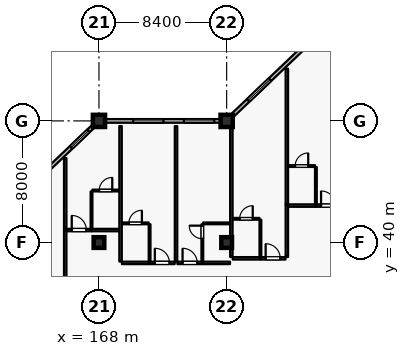
"""IFC4 building model, lengths in metres.
Left out: names, types, materials, properties, quantities, classifications, styles, units other than length and angle.
Written with IfcOpenShell. Run it as: python <this file> out.ifc"""

import sys

from ifc_helpers import new_model, si_unit, direction, frame, frame_2d, origin, origin_2d, place, context, subcontext, project, spatial, rectangle, extrude, element, fill, save


model = new_model("IFC4")
c1 = context("Model", 3, precision=1e-05, world=origin(), true_north=direction((0.0, 1.0)))
c2 = subcontext(c1, "Body", "Model", "MODEL_VIEW")
j1 = project(units=[si_unit("LENGTHUNIT", "METRE"), si_unit("PLANEANGLEUNIT", "RADIAN")], contexts=[c1])
p1 = place(None, origin())
s1 = spatial("IfcSite", under=j1, at=p1, CompositionType="ELEMENT")
p2 = place(p1, origin())
s2 = spatial("IfcBuilding", under=s1, at=p2, CompositionType="ELEMENT")
p3 = place(p2, frame((0.0, 0.0, 11.4)))
s3 = spatial("IfcBuildingStorey", under=s2, at=p3, CompositionType="ELEMENT", Elevation=11.4)
for number, where, z_axis, x_axis in (
    (1, (168.0, 48.0, 0.0), (0.0, 0.0, 1.0), (1.0, 0.0, 0.0)),
    (2, (176.4, 48.0, 0.0), (0.0, 0.0, 1.0), (1.0, 0.0, 0.0)),
):
    element("IfcColumn", number, at=place(p3, frame(where, z_axis=z_axis, x_axis=x_axis)), inside=s3, PredefinedType="COLUMN", context=c2, shape_type="SweptSolid", body=[
        extrude(rectangle(XDim=0.8, YDim=0.8, at=origin_2d()), origin(), (0.0, 0.0, 1.0), 4.8),
    ])
for number, where, z_axis, x_axis in (
    (3, (168.0, 40.0, 0.0), (0.0, 0.0, 1.0), (1.0, 0.0, 0.0)),
    (4, (176.4, 40.0, 0.0), (0.0, 0.0, 1.0), (1.0, 0.0, 0.0)),
):
    element("IfcColumn", number, at=place(p3, frame(where, z_axis=z_axis, x_axis=x_axis)), inside=s3, PredefinedType="COLUMN", context=c2, shape_type="SweptSolid", body=[
        extrude(rectangle(XDim=0.7, YDim=0.7, at=origin_2d()), origin(), (0.0, 0.0, 1.0), 4.8),
    ])
p4 = place(p3, frame((160.0, 40.381, 0.0), z_axis=(0.0, 0.0, 1.0), x_axis=(0.724156739794, 0.689635422677, 0.0)))
e5 = element("IfcWall", 5, at=p4, inside=s3, PredefinedType="SOLIDWALL", context=c2, shape_type="SweptSolid", body=[
    extrude(rectangle(XDim=10.495, YDim=0.24, at=frame_2d((5.248, 0.0))), origin(), (0.0, 0.0, 1.0), 4.13),
])
p5 = place(p4, frame((0.602, 0.0, 0.8)))
e6 = element("IfcOpeningElement", 6, at=p5, cuts=e5, PredefinedType="OPENING", context=c2, shape_type="SweptSolid", body=[
    extrude(rectangle(XDim=1.6, YDim=1.6, at=frame_2d((0.8, 0.8))), frame((0.0, 0.13, 0.0), z_axis=(0.0, -1.0, 0.0), x_axis=(1.0, 0.0, 0.0)), (0.0, 0.0, 1.0), 0.26),
])
p6 = place(p4, frame((4.662, 0.0, 0.8)))
e7 = element("IfcOpeningElement", 7, at=p6, cuts=e5, PredefinedType="OPENING", context=c2, shape_type="SweptSolid", body=[
    extrude(rectangle(XDim=1.6, YDim=1.6, at=frame_2d((0.8, 0.8))), frame((0.0, 0.13, 0.0), z_axis=(0.0, -1.0, 0.0), x_axis=(1.0, 0.0, 0.0)), (0.0, 0.0, 1.0), 0.26),
])
p7 = place(p4, frame((8.508, 0.0, 0.8)))
e8 = element("IfcOpeningElement", 8, at=p7, cuts=e5, PredefinedType="OPENING", context=c2, shape_type="SweptSolid", body=[
    extrude(rectangle(XDim=1.6, YDim=1.6, at=frame_2d((0.8, 0.8))), frame((0.0, 0.13, 0.0), z_axis=(0.0, -1.0, 0.0), x_axis=(1.0, 0.0, 0.0)), (0.0, 0.0, 1.0), 0.26),
])
p8 = place(p3, frame((168.4, 48.0, 0.0), z_axis=(0.0, 0.0, 1.0), x_axis=(1.0, 0.0, 0.0)))
e9 = element("IfcWall", 9, at=p8, inside=s3, PredefinedType="SOLIDWALL", context=c2, shape_type="SweptSolid", body=[
    extrude(rectangle(XDim=7.6, YDim=0.24, at=frame_2d((3.8, 0.0))), origin(), (0.0, 0.0, 1.0), 4.13),
])
p9 = place(p8, frame((1.845, 0.0, 0.8)))
e10 = element("IfcOpeningElement", 10, at=p9, cuts=e9, PredefinedType="OPENING", context=c2, shape_type="SweptSolid", body=[
    extrude(rectangle(XDim=2.0, YDim=1.75, at=frame_2d((1.0, 0.875))), frame((0.0, 0.13, 0.0), z_axis=(0.0, -1.0, 0.0), x_axis=(1.0, 0.0, 0.0)), (0.0, 0.0, 1.0), 0.26),
])
p10 = place(p8, frame((5.185, 0.0, 0.8)))
e11 = element("IfcOpeningElement", 11, at=p10, cuts=e9, PredefinedType="OPENING", context=c2, shape_type="SweptSolid", body=[
    extrude(rectangle(XDim=2.0, YDim=1.75, at=frame_2d((1.0, 0.875))), frame((0.0, 0.13, 0.0), z_axis=(0.0, -1.0, 0.0), x_axis=(1.0, 0.0, 0.0)), (0.0, 0.0, 1.0), 0.26),
])
p11 = place(p3, frame((176.8, 48.381, 0.0), z_axis=(0.0, 0.0, 1.0), x_axis=(0.724145676014, 0.689647040094, 0.0)))
e12 = element("IfcWall", 12, at=p11, inside=s3, PredefinedType="SOLIDWALL", context=c2, shape_type="SweptSolid", body=[
    extrude(rectangle(XDim=10.495, YDim=0.24, at=frame_2d((5.248, 0.0))), origin(), (0.0, 0.0, 1.0), 4.13),
])
p12 = place(p11, frame((1.396, 0.0, 0.8)))
e13 = element("IfcOpeningElement", 13, at=p12, cuts=e12, PredefinedType="OPENING", context=c2, shape_type="SweptSolid", body=[
    extrude(rectangle(XDim=2.0, YDim=1.75, at=frame_2d((1.0, 0.875))), frame((0.0, 0.13, 0.0), z_axis=(0.0, -1.0, 0.0), x_axis=(1.0, 0.0, 0.0)), (0.0, 0.0, 1.0), 0.26),
])
p13 = place(p11, frame((6.429, 0.0, 0.8)))
e14 = element("IfcOpeningElement", 14, at=p13, cuts=e12, PredefinedType="OPENING", context=c2, shape_type="SweptSolid", body=[
    extrude(rectangle(XDim=2.0, YDim=1.75, at=frame_2d((1.0, 0.875))), frame((0.0, 0.13, 0.0), z_axis=(0.0, -1.0, 0.0), x_axis=(1.0, 0.0, 0.0)), (0.0, 0.0, 1.0), 0.26),
])
p14 = place(p3, frame((165.78, 32.26, 0.0), z_axis=(0.0, 0.0, 1.0), x_axis=(0.0, 1.0, 0.0)))
e15 = element("IfcWall", 15, at=p14, inside=s3, PredefinedType="PARTITIONING", context=c2, shape_type="SweptSolid", body=[
    extrude(rectangle(XDim=8.64, YDim=0.16, at=frame_2d((4.32, 0.0))), origin(), (0.0, 0.0, 1.0), 4.535),
])
p15 = place(p3, frame((165.87, 40.82, 0.0), z_axis=(0.0, 0.0, 1.0), x_axis=(1.0, 0.0, 0.0)))
e16 = element("IfcWall", 16, at=p15, inside=s3, PredefinedType="PARTITIONING", context=c2, shape_type="SweptSolid", body=[
    extrude(rectangle(XDim=1.64, YDim=0.16, at=frame_2d((0.82, 0.0))), origin(), (0.0, 0.0, 1.0), 4.535),
])
p16 = place(p15, frame((0.34, 0.0, 0.0)))
e17 = element("IfcOpeningElement", 17, at=p16, cuts=e16, PredefinedType="OPENING", context=c2, shape_type="SweptSolid", body=[
    extrude(rectangle(XDim=0.96, YDim=2.2, at=frame_2d((0.48, 1.1))), frame((0.0, 0.09, 0.0), z_axis=(0.0, -1.0, 0.0), x_axis=(1.0, 0.0, 0.0)), (0.0, 0.0, 1.0), 0.18),
])
p17 = place(p3, frame((167.52, 40.82, 0.0), z_axis=(0.0, 0.0, 1.0), x_axis=(1.0, 0.0, 0.0)))
e18 = element("IfcWall", 18, at=p17, inside=s3, PredefinedType="PARTITIONING", context=c2, shape_type="SweptSolid", body=[
    extrude(rectangle(XDim=1.81, YDim=0.16, at=frame_2d((0.905, 0.0))), origin(), (0.0, 0.0, 1.0), 4.535),
])
p18 = place(p3, frame((167.51, 40.91, 0.0), z_axis=(0.0, 0.0, 1.0), x_axis=(0.0, 1.0, 0.0)))
e19 = element("IfcWall", 19, at=p18, inside=s3, PredefinedType="PARTITIONING", context=c2, shape_type="SweptSolid", body=[
    extrude(rectangle(XDim=2.45, YDim=0.115, at=frame_2d((1.225, 0.0))), origin(), (0.0, 0.0, 1.0), 4.535),
])
p19 = place(p3, frame((167.57, 43.42, 0.0), z_axis=(0.0, 0.0, 1.0), x_axis=(1.0, 0.0, 0.0)))
e20 = element("IfcWall", 20, at=p19, inside=s3, PredefinedType="PARTITIONING", context=c2, shape_type="SweptSolid", body=[
    extrude(rectangle(XDim=1.75, YDim=0.115, at=frame_2d((0.875, 0.0))), origin(), (0.0, 0.0, 1.0), 4.535),
])
p20 = place(p19, frame((0.445, 0.0, 0.0)))
e21 = element("IfcOpeningElement", 21, at=p20, cuts=e20, PredefinedType="OPENING", context=c2, shape_type="SweptSolid", body=[
    extrude(rectangle(XDim=0.86, YDim=2.12, at=frame_2d((0.43, 1.06))), frame((0.0, 0.067, 0.0), z_axis=(0.0, -1.0, 0.0), x_axis=(1.0, 0.0, 0.0)), (0.0, 0.0, 1.0), 0.135),
])
p21 = place(p3, frame((165.78, 40.91, 0.0), z_axis=(0.0, 0.0, 1.0), x_axis=(0.0, 1.0, 0.0)))
e22 = element("IfcWall", 22, at=p21, inside=s3, PredefinedType="PARTITIONING", context=c2, shape_type="SweptSolid", body=[
    extrude(rectangle(XDim=4.64, YDim=0.16, at=frame_2d((2.32, 0.0))), origin(), (0.0, 0.0, 1.0), 4.535),
])
p22 = place(p3, frame((169.51, 38.66, 0.0), z_axis=(0.0, 0.0, 1.0), x_axis=(1.0, 0.0, 0.0)))
e23 = element("IfcWall", 23, at=p22, inside=s3, PredefinedType="PARTITIONING", context=c2, shape_type="SweptSolid", body=[
    extrude(rectangle(XDim=1.81, YDim=0.16, at=frame_2d((0.905, 0.0))), origin(), (0.0, 0.0, 1.0), 4.535),
])
p23 = place(p3, frame((171.33, 38.66, 0.0), z_axis=(0.0, 0.0, 1.0), x_axis=(1.0, 0.0, 0.0)))
e24 = element("IfcWall", 24, at=p23, inside=s3, PredefinedType="PARTITIONING", context=c2, shape_type="SweptSolid", body=[
    extrude(rectangle(XDim=1.65, YDim=0.16, at=frame_2d((0.825, 0.0))), origin(), (0.0, 0.0, 1.0), 4.535),
])
p24 = place(p23, frame((0.345, 0.0, 0.0)))
e25 = element("IfcOpeningElement", 25, at=p24, cuts=e24, PredefinedType="OPENING", context=c2, shape_type="SweptSolid", body=[
    extrude(rectangle(XDim=0.96, YDim=2.2, at=frame_2d((0.48, 1.1))), frame((0.0, 0.09, 0.0), z_axis=(0.0, -1.0, 0.0), x_axis=(1.0, 0.0, 0.0)), (0.0, 0.0, 1.0), 0.18),
])
p25 = place(p3, frame((171.33, 38.75, 0.0), z_axis=(0.0, 0.0, 1.0), x_axis=(0.0, 1.0, 0.0)))
e26 = element("IfcWall", 26, at=p25, inside=s3, PredefinedType="PARTITIONING", context=c2, shape_type="SweptSolid", body=[
    extrude(rectangle(XDim=2.45, YDim=0.115, at=frame_2d((1.225, 0.0))), origin(), (0.0, 0.0, 1.0), 4.535),
])
p26 = place(p3, frame((169.52, 41.26, 0.0), z_axis=(0.0, 0.0, 1.0), x_axis=(1.0, 0.0, 0.0)))
e27 = element("IfcWall", 27, at=p26, inside=s3, PredefinedType="PARTITIONING", context=c2, shape_type="SweptSolid", body=[
    extrude(rectangle(XDim=1.75, YDim=0.115, at=frame_2d((0.875, 0.0))), origin(), (0.0, 0.0, 1.0), 4.535),
])
p27 = place(p26, frame((0.445, 0.0, 0.0)))
e28 = element("IfcOpeningElement", 28, at=p27, cuts=e27, PredefinedType="OPENING", context=c2, shape_type="SweptSolid", body=[
    extrude(rectangle(XDim=0.86, YDim=2.12, at=frame_2d((0.43, 1.06))), frame((0.0, 0.067, 0.0), z_axis=(0.0, -1.0, 0.0), x_axis=(1.0, 0.0, 0.0)), (0.0, 0.0, 1.0), 0.135),
])
p28 = place(p3, frame((169.42, 38.75, 0.0), z_axis=(0.0, 0.0, 1.0), x_axis=(0.0, 1.0, 0.0)))
e29 = element("IfcWall", 29, at=p28, inside=s3, PredefinedType="PARTITIONING", context=c2, shape_type="SweptSolid", body=[
    extrude(rectangle(XDim=8.91, YDim=0.16, at=frame_2d((4.455, 0.0))), origin(), (0.0, 0.0, 1.0), 4.535),
])
p29 = place(p3, frame((173.16, 38.66, 0.0), z_axis=(0.0, 0.0, 1.0), x_axis=(1.0, 0.0, 0.0)))
e30 = element("IfcWall", 30, at=p29, inside=s3, PredefinedType="PARTITIONING", context=c2, shape_type="SweptSolid", body=[
    extrude(rectangle(XDim=1.64, YDim=0.16, at=frame_2d((0.82, 0.0))), origin(), (0.0, 0.0, 1.0), 4.535),
])
p30 = place(p29, frame((0.34, 0.0, 0.0)))
e31 = element("IfcOpeningElement", 31, at=p30, cuts=e30, PredefinedType="OPENING", context=c2, shape_type="SweptSolid", body=[
    extrude(rectangle(XDim=0.96, YDim=2.2, at=frame_2d((0.48, 1.1))), frame((0.0, 0.09, 0.0), z_axis=(0.0, -1.0, 0.0), x_axis=(1.0, 0.0, 0.0)), (0.0, 0.0, 1.0), 0.18),
])
p31 = place(p3, frame((174.81, 38.66, 0.0), z_axis=(0.0, 0.0, 1.0), x_axis=(1.0, 0.0, 0.0)))
e32 = element("IfcWall", 32, at=p31, inside=s3, PredefinedType="PARTITIONING", context=c2, shape_type="SweptSolid", body=[
    extrude(rectangle(XDim=1.81, YDim=0.16, at=frame_2d((0.905, 0.0))), origin(), (0.0, 0.0, 1.0), 4.535),
])
p32 = place(p3, frame((174.8, 38.75, 0.0), z_axis=(0.0, 0.0, 1.0), x_axis=(0.0, 1.0, 0.0)))
e33 = element("IfcWall", 33, at=p32, inside=s3, PredefinedType="PARTITIONING", context=c2, shape_type="SweptSolid", body=[
    extrude(rectangle(XDim=2.45, YDim=0.115, at=frame_2d((1.225, 0.0))), origin(), (0.0, 0.0, 1.0), 4.535),
])
p33 = place(p32, frame((1.5, 0.0, 0.0)))
e34 = element("IfcOpeningElement", 34, at=p33, cuts=e33, PredefinedType="OPENING", context=c2, shape_type="SweptSolid", body=[
    extrude(rectangle(XDim=0.86, YDim=2.12, at=frame_2d((0.43, 1.06))), frame((0.0, 0.067, 0.0), z_axis=(0.0, -1.0, 0.0), x_axis=(1.0, 0.0, 0.0)), (0.0, 0.0, 1.0), 0.135),
])
p34 = place(p3, frame((174.86, 41.26, 0.0), z_axis=(0.0, 0.0, 1.0), x_axis=(1.0, 0.0, 0.0)))
e35 = element("IfcWall", 35, at=p34, inside=s3, PredefinedType="PARTITIONING", context=c2, shape_type="SweptSolid", body=[
    extrude(rectangle(XDim=1.75, YDim=0.115, at=frame_2d((0.875, 0.0))), origin(), (0.0, 0.0, 1.0), 4.535),
])
p35 = place(p3, frame((173.07, 38.75, 0.0), z_axis=(0.0, 0.0, 1.0), x_axis=(0.0, 1.0, 0.0)))
e36 = element("IfcWall", 36, at=p35, inside=s3, PredefinedType="PARTITIONING", context=c2, shape_type="SweptSolid", body=[
    extrude(rectangle(XDim=8.91, YDim=0.16, at=frame_2d((4.455, 0.0))), origin(), (0.0, 0.0, 1.0), 4.535),
])
p36 = place(p3, frame((176.8, 38.96, 0.0), z_axis=(0.0, 0.0, 1.0), x_axis=(1.0, 0.0, 0.0)))
e37 = element("IfcWall", 37, at=p36, inside=s3, PredefinedType="PARTITIONING", context=c2, shape_type="SweptSolid", body=[
    extrude(rectangle(XDim=1.81, YDim=0.16, at=frame_2d((0.905, 0.0))), origin(), (0.0, 0.0, 1.0), 4.535),
])
p37 = place(p3, frame((178.62, 38.96, 0.0), z_axis=(0.0, 0.0, 1.0), x_axis=(1.0, 0.0, 0.0)))
e38 = element("IfcWall", 38, at=p37, inside=s3, PredefinedType="PARTITIONING", context=c2, shape_type="SweptSolid", body=[
    extrude(rectangle(XDim=1.65, YDim=0.16, at=frame_2d((0.825, 0.0))), origin(), (0.0, 0.0, 1.0), 4.535),
])
p38 = place(p37, frame((0.345, 0.0, 0.0)))
e39 = element("IfcOpeningElement", 39, at=p38, cuts=e38, PredefinedType="OPENING", context=c2, shape_type="SweptSolid", body=[
    extrude(rectangle(XDim=0.96, YDim=2.2, at=frame_2d((0.48, 1.1))), frame((0.0, 0.09, 0.0), z_axis=(0.0, -1.0, 0.0), x_axis=(1.0, 0.0, 0.0)), (0.0, 0.0, 1.0), 0.18),
])
p39 = place(p3, frame((178.62, 39.05, 0.0), z_axis=(0.0, 0.0, 1.0), x_axis=(0.0, 1.0, 0.0)))
e40 = element("IfcWall", 40, at=p39, inside=s3, PredefinedType="PARTITIONING", context=c2, shape_type="SweptSolid", body=[
    extrude(rectangle(XDim=2.45, YDim=0.115, at=frame_2d((1.225, 0.0))), origin(), (0.0, 0.0, 1.0), 4.535),
])
p40 = place(p3, frame((176.81, 41.56, 0.0), z_axis=(0.0, 0.0, 1.0), x_axis=(1.0, 0.0, 0.0)))
e41 = element("IfcWall", 41, at=p40, inside=s3, PredefinedType="PARTITIONING", context=c2, shape_type="SweptSolid", body=[
    extrude(rectangle(XDim=1.75, YDim=0.115, at=frame_2d((0.875, 0.0))), origin(), (0.0, 0.0, 1.0), 4.535),
])
p41 = place(p40, frame((0.445, 0.0, 0.0)))
e42 = element("IfcOpeningElement", 42, at=p41, cuts=e41, PredefinedType="OPENING", context=c2, shape_type="SweptSolid", body=[
    extrude(rectangle(XDim=0.86, YDim=2.12, at=frame_2d((0.43, 1.06))), frame((0.0, 0.067, 0.0), z_axis=(0.0, -1.0, 0.0), x_axis=(1.0, 0.0, 0.0)), (0.0, 0.0, 1.0), 0.135),
])
p42 = place(p3, frame((176.71, 39.05, 0.0), z_axis=(0.0, 0.0, 1.0), x_axis=(0.0, 1.0, 0.0)))
e43 = element("IfcWall", 43, at=p42, inside=s3, PredefinedType="PARTITIONING", context=c2, shape_type="SweptSolid", body=[
    extrude(rectangle(XDim=8.91, YDim=0.16, at=frame_2d((4.455, 0.0))), origin(), (0.0, 0.0, 1.0), 4.535),
])
p43 = place(p3, frame((180.36, 39.05, 0.0), z_axis=(0.0, 0.0, 1.0), x_axis=(0.0, 1.0, 0.0)))
e44 = element("IfcWall", 44, at=p43, inside=s3, PredefinedType="PARTITIONING", context=c2, shape_type="SweptSolid", body=[
    extrude(rectangle(XDim=3.46, YDim=0.16, at=frame_2d((1.73, 0.0))), origin(), (0.0, 0.0, 1.0), 4.535),
])
p44 = place(p3, frame((180.45, 42.43, 0.0), z_axis=(0.0, 0.0, 1.0), x_axis=(1.0, 0.0, 0.0)))
e45 = element("IfcWall", 45, at=p44, inside=s3, PredefinedType="PARTITIONING", context=c2, shape_type="SweptSolid", body=[
    extrude(rectangle(XDim=1.81, YDim=0.16, at=frame_2d((0.905, 0.0))), origin(), (0.0, 0.0, 1.0), 4.535),
])
p45 = place(p3, frame((182.27, 42.43, 0.0), z_axis=(0.0, 0.0, 1.0), x_axis=(1.0, 0.0, 0.0)))
e46 = element("IfcWall", 46, at=p45, inside=s3, PredefinedType="PARTITIONING", context=c2, shape_type="SweptSolid", body=[
    extrude(rectangle(XDim=1.64, YDim=0.16, at=frame_2d((0.82, 0.0))), origin(), (0.0, 0.0, 1.0), 4.535),
])
p46 = place(p45, frame((0.34, 0.0, 0.0)))
e47 = element("IfcOpeningElement", 47, at=p46, cuts=e46, PredefinedType="OPENING", context=c2, shape_type="SweptSolid", body=[
    extrude(rectangle(XDim=0.96, YDim=2.2, at=frame_2d((0.48, 1.1))), frame((0.0, 0.09, 0.0), z_axis=(0.0, -1.0, 0.0), x_axis=(1.0, 0.0, 0.0)), (0.0, 0.0, 1.0), 0.18),
])
p47 = place(p3, frame((182.27, 42.52, 0.0), z_axis=(0.0, 0.0, 1.0), x_axis=(0.0, 1.0, 0.0)))
e48 = element("IfcWall", 48, at=p47, inside=s3, PredefinedType="PARTITIONING", context=c2, shape_type="SweptSolid", body=[
    extrude(rectangle(XDim=2.45, YDim=0.115, at=frame_2d((1.225, 0.0))), origin(), (0.0, 0.0, 1.0), 4.535),
])
p48 = place(p3, frame((180.46, 45.03, 0.0), z_axis=(0.0, 0.0, 1.0), x_axis=(1.0, 0.0, 0.0)))
e49 = element("IfcWall", 49, at=p48, inside=s3, PredefinedType="PARTITIONING", context=c2, shape_type="SweptSolid", body=[
    extrude(rectangle(XDim=1.75, YDim=0.115, at=frame_2d((0.875, 0.0))), origin(), (0.0, 0.0, 1.0), 4.535),
])
p49 = place(p48, frame((0.445, 0.0, 0.0)))
e50 = element("IfcOpeningElement", 50, at=p49, cuts=e49, PredefinedType="OPENING", context=c2, shape_type="SweptSolid", body=[
    extrude(rectangle(XDim=0.86, YDim=2.12, at=frame_2d((0.43, 1.06))), frame((0.0, 0.067, 0.0), z_axis=(0.0, -1.0, 0.0), x_axis=(1.0, 0.0, 0.0)), (0.0, 0.0, 1.0), 0.135),
])
p50 = place(p3, frame((180.36, 42.52, 0.0), z_axis=(0.0, 0.0, 1.0), x_axis=(0.0, 1.0, 0.0)))
e51 = element("IfcWall", 51, at=p50, inside=s3, PredefinedType="PARTITIONING", context=c2, shape_type="SweptSolid", body=[
    extrude(rectangle(XDim=8.91, YDim=0.16, at=frame_2d((4.455, 0.0))), origin(), (0.0, 0.0, 1.0), 4.535),
])
p51 = place(p7, origin())
e52 = element("IfcWindow", 52, at=p51, inside=s3, PartitioningType="SINGLE_PANEL", PredefinedType="WINDOW", context=c2, shape_type="SweptSolid", body=[
    extrude(rectangle(XDim=1.6, YDim=1.6, at=frame_2d((0.8, 0.8))), frame((0.0, 0.03, 0.0), z_axis=(0.0, -1.0, 0.0), x_axis=(1.0, 0.0, 0.0)), (0.0, 0.0, 1.0), 0.06),
])
fill(e8, e52)
p52 = place(p9, origin())
e53 = element("IfcWindow", 53, at=p52, inside=s3, PartitioningType="DOUBLE_PANEL_VERTICAL", PredefinedType="WINDOW", context=c2, shape_type="SweptSolid", body=[
    extrude(rectangle(XDim=2.0, YDim=1.75, at=frame_2d((1.0, 0.875))), frame((0.0, 0.03, 0.0), z_axis=(0.0, -1.0, 0.0), x_axis=(1.0, 0.0, 0.0)), (0.0, 0.0, 1.0), 0.06),
])
fill(e10, e53)
p53 = place(p10, origin())
e54 = element("IfcWindow", 54, at=p53, inside=s3, PartitioningType="DOUBLE_PANEL_VERTICAL", PredefinedType="WINDOW", context=c2, shape_type="SweptSolid", body=[
    extrude(rectangle(XDim=2.0, YDim=1.75, at=frame_2d((1.0, 0.875))), frame((0.0, 0.03, 0.0), z_axis=(0.0, -1.0, 0.0), x_axis=(1.0, 0.0, 0.0)), (0.0, 0.0, 1.0), 0.06),
])
fill(e11, e54)
p54 = place(p12, origin())
e55 = element("IfcWindow", 55, at=p54, inside=s3, PartitioningType="DOUBLE_PANEL_VERTICAL", PredefinedType="WINDOW", context=c2, shape_type="SweptSolid", body=[
    extrude(rectangle(XDim=2.0, YDim=1.75, at=frame_2d((1.0, 0.875))), frame((0.0, 0.03, 0.0), z_axis=(0.0, -1.0, 0.0), x_axis=(1.0, 0.0, 0.0)), (0.0, 0.0, 1.0), 0.06),
])
fill(e13, e55)
p55 = place(p16, origin())
e56 = element("IfcDoor", 56, at=p55, inside=s3, OperationType="SINGLE_SWING_LEFT", PredefinedType="DOOR", context=c2, shape_type="SweptSolid", body=[
    extrude(rectangle(XDim=0.96, YDim=2.2, at=frame_2d((0.48, 1.1))), frame((0.0, 0.025, 0.0), z_axis=(0.0, -1.0, 0.0), x_axis=(1.0, 0.0, 0.0)), (0.0, 0.0, 1.0), 0.05),
])
fill(e17, e56)
p56 = place(p20, origin())
e57 = element("IfcDoor", 57, at=p56, inside=s3, OperationType="SINGLE_SWING_RIGHT", PredefinedType="DOOR", context=c2, shape_type="SweptSolid", body=[
    extrude(rectangle(XDim=0.86, YDim=2.12, at=frame_2d((0.43, 1.06))), frame((0.0, 0.025, 0.0), z_axis=(0.0, -1.0, 0.0), x_axis=(1.0, 0.0, 0.0)), (0.0, 0.0, 1.0), 0.05),
])
fill(e21, e57)
p57 = place(p24, origin())
e58 = element("IfcDoor", 58, at=p57, inside=s3, OperationType="SINGLE_SWING_LEFT", PredefinedType="DOOR", context=c2, shape_type="SweptSolid", body=[
    extrude(rectangle(XDim=0.96, YDim=2.2, at=frame_2d((0.48, 1.1))), frame((0.0, 0.025, 0.0), z_axis=(0.0, -1.0, 0.0), x_axis=(1.0, 0.0, 0.0)), (0.0, 0.0, 1.0), 0.05),
])
fill(e25, e58)
p58 = place(p27, origin())
e59 = element("IfcDoor", 59, at=p58, inside=s3, OperationType="SINGLE_SWING_RIGHT", PredefinedType="DOOR", context=c2, shape_type="SweptSolid", body=[
    extrude(rectangle(XDim=0.86, YDim=2.12, at=frame_2d((0.43, 1.06))), frame((0.0, 0.025, 0.0), z_axis=(0.0, -1.0, 0.0), x_axis=(1.0, 0.0, 0.0)), (0.0, 0.0, 1.0), 0.05),
])
fill(e28, e59)
p59 = place(p30, origin())
e60 = element("IfcDoor", 60, at=p59, inside=s3, OperationType="SINGLE_SWING_LEFT", PredefinedType="DOOR", context=c2, shape_type="SweptSolid", body=[
    extrude(rectangle(XDim=0.96, YDim=2.2, at=frame_2d((0.48, 1.1))), frame((0.0, 0.025, 0.0), z_axis=(0.0, -1.0, 0.0), x_axis=(1.0, 0.0, 0.0)), (0.0, 0.0, 1.0), 0.05),
])
fill(e31, e60)
p60 = place(p33, origin())
e61 = element("IfcDoor", 61, at=p60, inside=s3, OperationType="SINGLE_SWING_RIGHT", PredefinedType="DOOR", context=c2, shape_type="SweptSolid", body=[
    extrude(rectangle(XDim=0.86, YDim=2.12, at=frame_2d((0.43, 1.06))), frame((0.0, 0.025, 0.0), z_axis=(0.0, -1.0, 0.0), x_axis=(1.0, 0.0, 0.0)), (0.0, 0.0, 1.0), 0.05),
])
fill(e34, e61)
p61 = place(p38, origin())
e62 = element("IfcDoor", 62, at=p61, inside=s3, OperationType="SINGLE_SWING_LEFT", PredefinedType="DOOR", context=c2, shape_type="SweptSolid", body=[
    extrude(rectangle(XDim=0.96, YDim=2.2, at=frame_2d((0.48, 1.1))), frame((0.0, 0.025, 0.0), z_axis=(0.0, -1.0, 0.0), x_axis=(1.0, 0.0, 0.0)), (0.0, 0.0, 1.0), 0.05),
])
fill(e39, e62)
p62 = place(p41, origin())
e63 = element("IfcDoor", 63, at=p62, inside=s3, OperationType="SINGLE_SWING_RIGHT", PredefinedType="DOOR", context=c2, shape_type="SweptSolid", body=[
    extrude(rectangle(XDim=0.86, YDim=2.12, at=frame_2d((0.43, 1.06))), frame((0.0, 0.025, 0.0), z_axis=(0.0, -1.0, 0.0), x_axis=(1.0, 0.0, 0.0)), (0.0, 0.0, 1.0), 0.05),
])
fill(e42, e63)
p63 = place(p46, origin())
e64 = element("IfcDoor", 64, at=p63, inside=s3, OperationType="SINGLE_SWING_LEFT", PredefinedType="DOOR", context=c2, shape_type="SweptSolid", body=[
    extrude(rectangle(XDim=0.96, YDim=2.2, at=frame_2d((0.48, 1.1))), frame((0.0, 0.025, 0.0), z_axis=(0.0, -1.0, 0.0), x_axis=(1.0, 0.0, 0.0)), (0.0, 0.0, 1.0), 0.05),
])
fill(e47, e64)
p64 = place(p49, origin())
e65 = element("IfcDoor", 65, at=p64, inside=s3, OperationType="SINGLE_SWING_RIGHT", PredefinedType="DOOR", context=c2, shape_type="SweptSolid", body=[
    extrude(rectangle(XDim=0.86, YDim=2.12, at=frame_2d((0.43, 1.06))), frame((0.0, 0.025, 0.0), z_axis=(0.0, -1.0, 0.0), x_axis=(1.0, 0.0, 0.0)), (0.0, 0.0, 1.0), 0.05),
])
fill(e50, e65)
save(model, sys.argv[1])
